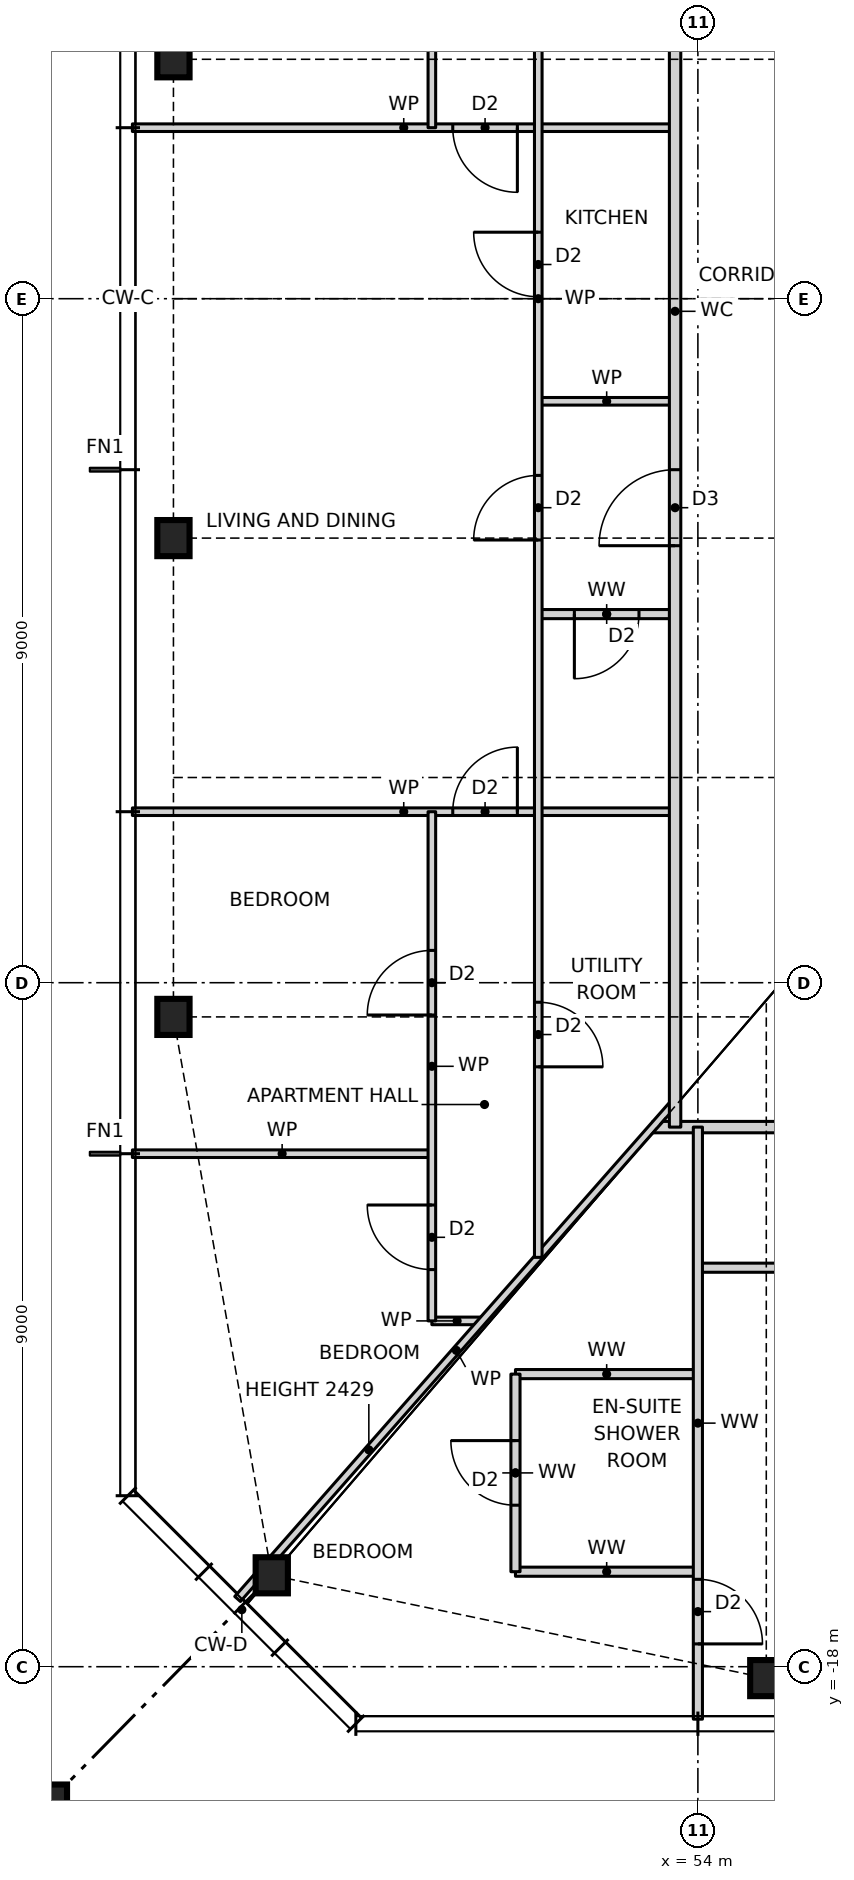
"""IFC4 building model, lengths in metres.
Left out: names, types, materials, properties, quantities, classifications, styles, units other than length and angle.
Written with IfcOpenShell. Run it as: python <this file> out.ifc"""

import sys

from ifc_helpers import new_model, si_unit, direction, frame, frame_2d, origin, origin_2d, place, context, subcontext, project, spatial, rectangle, hollow_rectangle, i_section, extrude, element, fill, save


model = new_model("IFC4")
c1 = context("Model", 3, precision=1e-05, world=origin(), true_north=direction((0.0, 1.0)))
c2 = subcontext(c1, "Body", "Model", "MODEL_VIEW")
j1 = project(units=[si_unit("LENGTHUNIT", "METRE"), si_unit("PLANEANGLEUNIT", "RADIAN")], contexts=[c1])
p1 = place(None, origin())
s1 = spatial("IfcSite", under=j1, at=p1, CompositionType="ELEMENT")
p2 = place(p1, origin())
s2 = spatial("IfcBuilding", under=s1, at=p2, CompositionType="ELEMENT")
p3 = place(p2, frame((0.0, 0.0, 15.0)))
s3 = spatial("IfcBuildingStorey", under=s2, at=p3, CompositionType="ELEMENT", Elevation=15.0)
for number, where, z_axis, x_axis in (
    (1, (48.394, -16.797, 0.0), (0.0, 0.0, 1.0), (1.0, 0.0, 0.0)),
    (2, (54.9, -18.15, 0.0), (0.0, 0.0, 1.0), (1.0, 0.0, 0.0)),
    (3, (47.1, 3.15, 0.0), (0.0, 0.0, 1.0), (1.0, 0.0, 0.0)),
    (4, (47.1, -3.15, 0.0), (0.0, 0.0, 1.0), (1.0, 0.0, 0.0)),
    (5, (47.1, -9.45, 0.0), (0.0, 0.0, 1.0), (1.0, 0.0, 0.0)),
):
    element("IfcColumn", number, at=place(p3, frame(where, z_axis=z_axis, x_axis=x_axis)), inside=s3, PredefinedType="COLUMN", context=c2, shape_type="SweptSolid", body=[
        extrude(i_section(OverallWidth=0.424, OverallDepth=0.475, WebThickness=0.048, FlangeThickness=0.077, at=origin_2d()), origin(), (0.0, 0.0, 1.0), 3.5),
    ])
p4 = place(p3, frame((45.1, -20.15, 0.0), z_axis=(0.0, 0.0, 1.0), x_axis=(1.0, 0.0, 0.0)))
e6 = element("IfcColumn", 6, at=p4, inside=s3, PredefinedType="COLUMN", context=c2, shape_type="SweptSolid", body=[
    extrude(hollow_rectangle(XDim=1.2, YDim=1.2, WallThickness=0.07, at=origin_2d()), origin(), (0.0, 0.0, 1.0), 3.5),
])
for number, where, z_axis, x_axis in (
    (7, (51.6, -16.75, 0.0), (0.0, 0.0, 1.0), (1.0, 0.0, 0.0)),
    (8, (51.6, -14.15, 0.0), (0.0, 0.0, 1.0), (1.0, 0.0, 0.0)),
):
    element("IfcWall", number, at=place(p3, frame(where, z_axis=z_axis, x_axis=x_axis)), inside=s3, PredefinedType="PARTITIONING", context=c2, shape_type="SweptSolid", body=[
        extrude(rectangle(XDim=2.4, YDim=0.12, at=frame_2d((1.2, 0.0))), origin(), (0.0, 0.0, 1.0), 3.27),
    ])
p5 = place(p3, frame((50.5, -13.45, 0.0), z_axis=(0.0, 0.0, 1.0), x_axis=(1.0, 0.0, 0.0)))
e9 = element("IfcWall", 9, at=p5, inside=s3, PredefinedType="PARTITIONING", context=c2, shape_type="SweptSolid", body=[
    extrude(rectangle(XDim=0.664, YDim=0.1, at=frame_2d((0.332, 0.0))), origin(), (0.0, 0.0, 1.0), 3.27),
])
p6 = place(p3, frame((54.0, -12.75, 0.0), z_axis=(0.0, 0.0, 1.0), x_axis=(1.0, 0.0, 0.0)))
e10 = element("IfcWall", 10, at=p6, inside=s3, PredefinedType="PARTITIONING", context=c2, shape_type="SweptSolid", body=[
    extrude(rectangle(XDim=20.2, YDim=0.12, at=frame_2d((10.1, 0.0))), origin(), (0.0, 0.0, 1.0), 3.27),
])
p7 = place(p6, frame((1.375, 0.0, 0.0)))
e11 = element("IfcOpeningElement", 11, at=p7, cuts=e10, PredefinedType="OPENING", context=c2, shape_type="SweptSolid", body=[
    extrude(rectangle(XDim=0.85, YDim=2.1, at=frame_2d((0.425, 1.05))), frame((0.0, 0.07, 0.0), z_axis=(0.0, -1.0, 0.0), x_axis=(1.0, 0.0, 0.0)), (0.0, 0.0, 1.0), 0.14),
])
p8 = place(p6, frame((4.575, 0.0, 0.0)))
e12 = element("IfcOpeningElement", 12, at=p8, cuts=e10, PredefinedType="OPENING", context=c2, shape_type="SweptSolid", body=[
    extrude(rectangle(XDim=0.85, YDim=2.1, at=frame_2d((0.425, 1.05))), frame((0.0, 0.07, 0.0), z_axis=(0.0, -1.0, 0.0), x_axis=(1.0, 0.0, 0.0)), (0.0, 0.0, 1.0), 0.14),
])
p9 = place(p6, frame((10.725, 0.0, 0.0)))
e13 = element("IfcOpeningElement", 13, at=p9, cuts=e10, PredefinedType="OPENING", context=c2, shape_type="SweptSolid", body=[
    extrude(rectangle(XDim=0.85, YDim=2.1, at=frame_2d((0.425, 1.05))), frame((0.0, 0.07, 0.0), z_axis=(0.0, -1.0, 0.0), x_axis=(1.0, 0.0, 0.0)), (0.0, 0.0, 1.0), 0.14),
])
p10 = place(p6, frame((16.325, 0.0, 0.0)))
e14 = element("IfcOpeningElement", 14, at=p10, cuts=e10, PredefinedType="OPENING", context=c2, shape_type="SweptSolid", body=[
    extrude(rectangle(XDim=0.85, YDim=2.1, at=frame_2d((0.425, 1.05))), frame((0.0, 0.07, 0.0), z_axis=(0.0, -1.0, 0.0), x_axis=(1.0, 0.0, 0.0)), (0.0, 0.0, 1.0), 0.14),
])
p11 = place(p3, frame((46.56, -11.25, 0.0), z_axis=(0.0, 0.0, 1.0), x_axis=(1.0, 0.0, 0.0)))
e15 = element("IfcWall", 15, at=p11, inside=s3, PredefinedType="PARTITIONING", context=c2, shape_type="SweptSolid", body=[
    extrude(rectangle(XDim=3.94, YDim=0.1, at=frame_2d((1.97, 0.0))), origin(), (0.0, 0.0, 1.0), 3.27),
])
p12 = place(p3, frame((53.408, -10.9, 0.0), z_axis=(0.0, 0.0, 1.0), x_axis=(1.0, 0.0, 0.0)))
e16 = element("IfcWall", 16, at=p12, inside=s3, PredefinedType="PARTITIONING", context=c2, shape_type="SweptSolid", body=[
    extrude(rectangle(XDim=19.184, YDim=0.15, at=frame_2d((9.592, 0.0))), origin(), (0.0, 0.0, 1.0), 3.27),
])
p13 = place(p12, frame((5.092, 0.0, 0.0)))
e17 = element("IfcOpeningElement", 17, at=p13, cuts=e16, PredefinedType="OPENING", context=c2, shape_type="SweptSolid", body=[
    extrude(rectangle(XDim=1.0, YDim=2.1, at=frame_2d((0.5, 1.05))), frame((0.0, 0.085, 0.0), z_axis=(0.0, -1.0, 0.0), x_axis=(1.0, 0.0, 0.0)), (0.0, 0.0, 1.0), 0.17),
])
p14 = place(p3, frame((46.56, -6.75, 0.0), z_axis=(0.0, 0.0, 1.0), x_axis=(1.0, 0.0, 0.0)))
e18 = element("IfcWall", 18, at=p14, inside=s3, PredefinedType="PARTITIONING", context=c2, shape_type="SweptSolid", body=[
    extrude(rectangle(XDim=7.14, YDim=0.1, at=frame_2d((3.57, 0.0))), origin(), (0.0, 0.0, 1.0), 3.27),
])
p15 = place(p14, frame((4.215, 0.0, 0.0)))
e19 = element("IfcOpeningElement", 19, at=p15, cuts=e18, PredefinedType="OPENING", context=c2, shape_type="SweptSolid", body=[
    extrude(rectangle(XDim=0.85, YDim=2.1, at=frame_2d((0.425, 1.05))), frame((0.0, 0.06, 0.0), z_axis=(0.0, -1.0, 0.0), x_axis=(1.0, 0.0, 0.0)), (0.0, 0.0, 1.0), 0.12),
])
p16 = place(p3, frame((51.9, -4.15, 0.0), z_axis=(0.0, 0.0, 1.0), x_axis=(1.0, 0.0, 0.0)))
e20 = element("IfcWall", 20, at=p16, inside=s3, PredefinedType="PARTITIONING", context=c2, shape_type="SweptSolid", body=[
    extrude(rectangle(XDim=1.8, YDim=0.12, at=frame_2d((0.9, 0.0))), origin(), (0.0, 0.0, 1.0), 3.27),
])
p17 = place(p16, frame((0.475, 0.0, 0.0)))
e21 = element("IfcOpeningElement", 21, at=p17, cuts=e20, PredefinedType="OPENING", context=c2, shape_type="SweptSolid", body=[
    extrude(rectangle(XDim=0.85, YDim=2.1, at=frame_2d((0.425, 1.05))), frame((0.0, 0.07, 0.0), z_axis=(0.0, -1.0, 0.0), x_axis=(1.0, 0.0, 0.0)), (0.0, 0.0, 1.0), 0.14),
])
p18 = place(p3, frame((51.9, -1.35, 0.0), z_axis=(0.0, 0.0, 1.0), x_axis=(1.0, 0.0, 0.0)))
e22 = element("IfcWall", 22, at=p18, inside=s3, PredefinedType="PARTITIONING", context=c2, shape_type="SweptSolid", body=[
    extrude(rectangle(XDim=1.8, YDim=0.1, at=frame_2d((0.9, 0.0))), origin(), (0.0, 0.0, 1.0), 3.27),
])
p19 = place(p3, frame((46.56, 2.25, 0.0), z_axis=(0.0, 0.0, 1.0), x_axis=(1.0, 0.0, 0.0)))
e23 = element("IfcWall", 23, at=p19, inside=s3, PredefinedType="PARTITIONING", context=c2, shape_type="SweptSolid", body=[
    extrude(rectangle(XDim=7.14, YDim=0.1, at=frame_2d((3.57, 0.0))), origin(), (0.0, 0.0, 1.0), 3.27),
])
p20 = place(p19, frame((4.215, 0.0, 0.0)))
e24 = element("IfcOpeningElement", 24, at=p20, cuts=e23, PredefinedType="OPENING", context=c2, shape_type="SweptSolid", body=[
    extrude(rectangle(XDim=0.85, YDim=2.1, at=frame_2d((0.425, 1.05))), frame((0.0, 0.06, 0.0), z_axis=(0.0, -1.0, 0.0), x_axis=(1.0, 0.0, 0.0)), (0.0, 0.0, 1.0), 0.12),
])
p21 = place(p3, frame((47.944, -17.109, 0.0), z_axis=(0.0, 0.0, 1.0), x_axis=(0.660612734851, 0.750726857487, 0.0)))
e25 = element("IfcWall", 25, at=p21, inside=s3, PredefinedType="PARTITIONING", context=c2, shape_type="SweptSolid", body=[
    extrude(rectangle(XDim=8.713, YDim=0.1, at=frame_2d((4.356, 0.0))), origin(), (0.0, 0.0, 1.0), 2.429),
])
p22 = place(p3, frame((54.0, -18.69, 0.0), z_axis=(0.0, 0.0, 1.0), x_axis=(0.0, 1.0, 0.0)))
e26 = element("IfcWall", 26, at=p22, inside=s3, PredefinedType="PARTITIONING", context=c2, shape_type="SweptSolid", body=[
    extrude(rectangle(XDim=7.79, YDim=0.12, at=frame_2d((3.895, 0.0))), origin(), (0.0, 0.0, 1.0), 3.27),
])
p23 = place(p22, frame((0.99, 0.0, 0.0)))
e27 = element("IfcOpeningElement", 27, at=p23, cuts=e26, PredefinedType="OPENING", context=c2, shape_type="SweptSolid", body=[
    extrude(rectangle(XDim=0.85, YDim=2.1, at=frame_2d((0.425, 1.05))), frame((0.0, 0.07, 0.0), z_axis=(0.0, -1.0, 0.0), x_axis=(1.0, 0.0, 0.0)), (0.0, 0.0, 1.0), 0.14),
])
p24 = place(p3, frame((53.7, -10.9, 0.0), z_axis=(0.0, 0.0, 1.0), x_axis=(0.0, 1.0, 0.0)))
e28 = element("IfcWall", 28, at=p24, inside=s3, PredefinedType="PARTITIONING", context=c2, shape_type="SweptSolid", body=[
    extrude(rectangle(XDim=21.468, YDim=0.15, at=frame_2d((10.734, 0.0))), origin(), (0.0, 0.0, 1.0), 3.27),
])
p25 = place(p24, frame((7.65, 0.0, 0.0)))
e29 = element("IfcOpeningElement", 29, at=p25, cuts=e28, PredefinedType="OPENING", context=c2, shape_type="SweptSolid", body=[
    extrude(rectangle(XDim=1.0, YDim=2.1, at=frame_2d((0.5, 1.05))), frame((0.0, 0.085, 0.0), z_axis=(0.0, -1.0, 0.0), x_axis=(1.0, 0.0, 0.0)), (0.0, 0.0, 1.0), 0.17),
])
p26 = place(p3, frame((51.9, -12.614, 0.0), z_axis=(0.0, 0.0, 1.0), x_axis=(0.0, 1.0, 0.0)))
e30 = element("IfcWall", 30, at=p26, inside=s3, PredefinedType="PARTITIONING", context=c2, shape_type="SweptSolid", body=[
    extrude(rectangle(XDim=25.228, YDim=0.1, at=frame_2d((12.614, 0.0))), origin(), (0.0, 0.0, 1.0), 3.27),
])
p27 = place(p26, frame((12.639, 0.0, 0.0)))
e31 = element("IfcOpeningElement", 31, at=p27, cuts=e30, PredefinedType="OPENING", context=c2, shape_type="SweptSolid", body=[
    extrude(rectangle(XDim=0.85, YDim=2.1, at=frame_2d((0.425, 1.05))), frame((0.0, 0.06, 0.0), z_axis=(0.0, -1.0, 0.0), x_axis=(1.0, 0.0, 0.0)), (0.0, 0.0, 1.0), 0.12),
])
p28 = place(p26, frame((9.439, 0.0, 0.0)))
e32 = element("IfcOpeningElement", 32, at=p28, cuts=e30, PredefinedType="OPENING", context=c2, shape_type="SweptSolid", body=[
    extrude(rectangle(XDim=0.85, YDim=2.1, at=frame_2d((0.425, 1.05))), frame((0.0, 0.06, 0.0), z_axis=(0.0, -1.0, 0.0), x_axis=(1.0, 0.0, 0.0)), (0.0, 0.0, 1.0), 0.12),
])
p29 = place(p26, frame((16.639, 0.0, 0.0)))
e33 = element("IfcOpeningElement", 33, at=p29, cuts=e30, PredefinedType="OPENING", context=c2, shape_type="SweptSolid", body=[
    extrude(rectangle(XDim=0.85, YDim=2.1, at=frame_2d((0.425, 1.05))), frame((0.0, 0.06, 0.0), z_axis=(0.0, -1.0, 0.0), x_axis=(1.0, 0.0, 0.0)), (0.0, 0.0, 1.0), 0.12),
])
p30 = place(p26, frame((21.821, 0.0, 0.0)))
e34 = element("IfcOpeningElement", 34, at=p30, cuts=e30, PredefinedType="OPENING", context=c2, shape_type="SweptSolid", body=[
    extrude(rectangle(XDim=0.85, YDim=2.1, at=frame_2d((0.425, 1.05))), frame((0.0, 0.06, 0.0), z_axis=(0.0, -1.0, 0.0), x_axis=(1.0, 0.0, 0.0)), (0.0, 0.0, 1.0), 0.12),
])
p31 = place(p26, frame((2.507, 0.0, 0.0)))
e35 = element("IfcOpeningElement", 35, at=p31, cuts=e30, PredefinedType="OPENING", context=c2, shape_type="SweptSolid", body=[
    extrude(rectangle(XDim=0.85, YDim=2.1, at=frame_2d((0.425, 1.05))), frame((0.0, 0.06, 0.0), z_axis=(0.0, -1.0, 0.0), x_axis=(1.0, 0.0, 0.0)), (0.0, 0.0, 1.0), 0.12),
])
p32 = place(p3, frame((51.6, -16.75, 0.0), z_axis=(0.0, 0.0, 1.0), x_axis=(0.0, 1.0, 0.0)))
e36 = element("IfcWall", 36, at=p32, inside=s3, PredefinedType="PARTITIONING", context=c2, shape_type="SweptSolid", body=[
    extrude(rectangle(XDim=2.6, YDim=0.12, at=frame_2d((1.3, 0.0))), origin(), (0.0, 0.0, 1.0), 3.27),
])
p33 = place(p32, frame((0.875, 0.0, 0.0)))
e37 = element("IfcOpeningElement", 37, at=p33, cuts=e36, PredefinedType="OPENING", context=c2, shape_type="SweptSolid", body=[
    extrude(rectangle(XDim=0.85, YDim=2.1, at=frame_2d((0.425, 1.05))), frame((0.0, 0.07, 0.0), z_axis=(0.0, -1.0, 0.0), x_axis=(1.0, 0.0, 0.0)), (0.0, 0.0, 1.0), 0.14),
])
p34 = place(p3, frame((50.5, -13.45, 0.0), z_axis=(0.0, 0.0, 1.0), x_axis=(0.0, 1.0, 0.0)))
e38 = element("IfcWall", 38, at=p34, inside=s3, PredefinedType="PARTITIONING", context=c2, shape_type="SweptSolid", body=[
    extrude(rectangle(XDim=6.7, YDim=0.1, at=frame_2d((3.35, 0.0))), origin(), (0.0, 0.0, 1.0), 3.27),
])
p35 = place(p34, frame((4.025, 0.0, 0.0)))
e39 = element("IfcOpeningElement", 39, at=p35, cuts=e38, PredefinedType="OPENING", context=c2, shape_type="SweptSolid", body=[
    extrude(rectangle(XDim=0.85, YDim=2.1, at=frame_2d((0.425, 1.05))), frame((0.0, 0.06, 0.0), z_axis=(0.0, -1.0, 0.0), x_axis=(1.0, 0.0, 0.0)), (0.0, 0.0, 1.0), 0.12),
])
p36 = place(p34, frame((0.675, 0.0, 0.0)))
e40 = element("IfcOpeningElement", 40, at=p36, cuts=e38, PredefinedType="OPENING", context=c2, shape_type="SweptSolid", body=[
    extrude(rectangle(XDim=0.85, YDim=2.1, at=frame_2d((0.425, 1.05))), frame((0.0, 0.06, 0.0), z_axis=(0.0, -1.0, 0.0), x_axis=(1.0, 0.0, 0.0)), (0.0, 0.0, 1.0), 0.12),
])
p37 = place(p3, frame((50.5, 2.25, 0.0), z_axis=(0.0, 0.0, 1.0), x_axis=(0.0, 1.0, 0.0)))
e41 = element("IfcWall", 41, at=p37, inside=s3, PredefinedType="PARTITIONING", context=c2, shape_type="SweptSolid", body=[
    extrude(rectangle(XDim=11.2, YDim=0.1, at=frame_2d((5.6, 0.0))), origin(), (0.0, 0.0, 1.0), 3.27),
])
p38 = place(p37, frame((1.825, 0.0, 0.0)))
e42 = element("IfcOpeningElement", 42, at=p38, cuts=e41, PredefinedType="OPENING", context=c2, shape_type="SweptSolid", body=[
    extrude(rectangle(XDim=0.85, YDim=2.1, at=frame_2d((0.425, 1.05))), frame((0.0, 0.06, 0.0), z_axis=(0.0, -1.0, 0.0), x_axis=(1.0, 0.0, 0.0)), (0.0, 0.0, 1.0), 0.12),
])
p39 = place(p37, frame((5.125, 0.0, 0.0)))
e43 = element("IfcOpeningElement", 43, at=p39, cuts=e41, PredefinedType="OPENING", context=c2, shape_type="SweptSolid", body=[
    extrude(rectangle(XDim=0.85, YDim=2.1, at=frame_2d((0.425, 1.05))), frame((0.0, 0.06, 0.0), z_axis=(0.0, -1.0, 0.0), x_axis=(1.0, 0.0, 0.0)), (0.0, 0.0, 1.0), 0.12),
])
p40 = place(p37, frame((9.675, 0.0, 0.0)))
e44 = element("IfcOpeningElement", 44, at=p40, cuts=e41, PredefinedType="OPENING", context=c2, shape_type="SweptSolid", body=[
    extrude(rectangle(XDim=0.85, YDim=2.1, at=frame_2d((0.425, 1.05))), frame((0.0, 0.06, 0.0), z_axis=(0.0, -1.0, 0.0), x_axis=(1.0, 0.0, 0.0)), (0.0, 0.0, 1.0), 0.12),
])
p41 = place(p33, origin())
e45 = element("IfcDoor", 45, at=p41, inside=s3, OperationType="SINGLE_SWING_RIGHT", PredefinedType="DOOR", context=c2, shape_type="SweptSolid", body=[
    extrude(rectangle(XDim=0.85, YDim=2.1, at=frame_2d((0.425, 1.05))), frame((0.0, 0.025, 0.0), z_axis=(0.0, -1.0, 0.0), x_axis=(1.0, 0.0, 0.0)), (0.0, 0.0, 1.0), 0.05),
])
fill(e37, e45)
p42 = place(p23, frame((0.85, 0.0, 0.0), z_axis=(0.0, 0.0, 1.0), x_axis=(-1.0, 0.0, 0.0)))
e46 = element("IfcDoor", 46, at=p42, inside=s3, OperationType="SINGLE_SWING_RIGHT", PredefinedType="DOOR", context=c2, shape_type="SweptSolid", body=[
    extrude(rectangle(XDim=0.85, YDim=2.1, at=frame_2d((0.425, 1.05))), frame((0.0, 0.025, 0.0), z_axis=(0.0, -1.0, 0.0), x_axis=(1.0, 0.0, 0.0)), (0.0, 0.0, 1.0), 0.05),
])
fill(e27, e46)
p43 = place(p27, origin())
e47 = element("IfcDoor", 47, at=p43, inside=s3, OperationType="SINGLE_SWING_RIGHT", PredefinedType="DOOR", context=c2, shape_type="SweptSolid", body=[
    extrude(rectangle(XDim=0.85, YDim=2.1, at=frame_2d((0.425, 1.05))), frame((0.0, 0.025, 0.0), z_axis=(0.0, -1.0, 0.0), x_axis=(1.0, 0.0, 0.0)), (0.0, 0.0, 1.0), 0.05),
])
fill(e31, e47)
p44 = place(p25, origin())
e48 = element("IfcDoor", 48, at=p44, inside=s3, OperationType="SINGLE_SWING_LEFT", PredefinedType="DOOR", context=c2, shape_type="SweptSolid", body=[
    extrude(rectangle(XDim=1.0, YDim=2.1, at=frame_2d((0.5, 1.05))), frame((0.0, 0.025, 0.0), z_axis=(0.0, -1.0, 0.0), x_axis=(1.0, 0.0, 0.0)), (0.0, 0.0, 1.0), 0.05),
])
fill(e29, e48)
p45 = place(p28, origin())
e49 = element("IfcDoor", 49, at=p45, inside=s3, OperationType="SINGLE_SWING_LEFT", PredefinedType="DOOR", context=c2, shape_type="SweptSolid", body=[
    extrude(rectangle(XDim=0.85, YDim=2.1, at=frame_2d((0.425, 1.05))), frame((0.0, 0.025, 0.0), z_axis=(0.0, -1.0, 0.0), x_axis=(1.0, 0.0, 0.0)), (0.0, 0.0, 1.0), 0.05),
])
fill(e32, e49)
p46 = place(p17, frame((0.85, 0.0, 0.0), z_axis=(0.0, 0.0, 1.0), x_axis=(-1.0, 0.0, 0.0)))
e50 = element("IfcDoor", 50, at=p46, inside=s3, OperationType="SINGLE_SWING_RIGHT", PredefinedType="DOOR", context=c2, shape_type="SweptSolid", body=[
    extrude(rectangle(XDim=0.85, YDim=2.1, at=frame_2d((0.425, 1.05))), frame((0.0, 0.025, 0.0), z_axis=(0.0, -1.0, 0.0), x_axis=(1.0, 0.0, 0.0)), (0.0, 0.0, 1.0), 0.05),
])
fill(e21, e50)
p47 = place(p20, frame((0.85, 0.0, 0.0), z_axis=(0.0, 0.0, 1.0), x_axis=(-1.0, 0.0, 0.0)))
e51 = element("IfcDoor", 51, at=p47, inside=s3, OperationType="SINGLE_SWING_LEFT", PredefinedType="DOOR", context=c2, shape_type="SweptSolid", body=[
    extrude(rectangle(XDim=0.85, YDim=2.1, at=frame_2d((0.425, 1.05))), frame((0.0, 0.025, 0.0), z_axis=(0.0, -1.0, 0.0), x_axis=(1.0, 0.0, 0.0)), (0.0, 0.0, 1.0), 0.05),
])
fill(e24, e51)
p48 = place(p15, origin())
e52 = element("IfcDoor", 52, at=p48, inside=s3, OperationType="SINGLE_SWING_RIGHT", PredefinedType="DOOR", context=c2, shape_type="SweptSolid", body=[
    extrude(rectangle(XDim=0.85, YDim=2.1, at=frame_2d((0.425, 1.05))), frame((0.0, 0.025, 0.0), z_axis=(0.0, -1.0, 0.0), x_axis=(1.0, 0.0, 0.0)), (0.0, 0.0, 1.0), 0.05),
])
fill(e19, e52)
p49 = place(p35, origin())
e53 = element("IfcDoor", 53, at=p49, inside=s3, OperationType="SINGLE_SWING_LEFT", PredefinedType="DOOR", context=c2, shape_type="SweptSolid", body=[
    extrude(rectangle(XDim=0.85, YDim=2.1, at=frame_2d((0.425, 1.05))), frame((0.0, 0.025, 0.0), z_axis=(0.0, -1.0, 0.0), x_axis=(1.0, 0.0, 0.0)), (0.0, 0.0, 1.0), 0.05),
])
fill(e39, e53)
p50 = place(p36, origin())
e54 = element("IfcDoor", 54, at=p50, inside=s3, OperationType="SINGLE_SWING_RIGHT", PredefinedType="DOOR", context=c2, shape_type="SweptSolid", body=[
    extrude(rectangle(XDim=0.85, YDim=2.1, at=frame_2d((0.425, 1.05))), frame((0.0, 0.025, 0.0), z_axis=(0.0, -1.0, 0.0), x_axis=(1.0, 0.0, 0.0)), (0.0, 0.0, 1.0), 0.05),
])
fill(e40, e54)
p51 = place(p31, frame((0.85, 0.0, 0.0), z_axis=(0.0, 0.0, 1.0), x_axis=(-1.0, 0.0, 0.0)))
e55 = element("IfcDoor", 55, at=p51, inside=s3, OperationType="SINGLE_SWING_RIGHT", PredefinedType="DOOR", context=c2, shape_type="SweptSolid", body=[
    extrude(rectangle(XDim=0.85, YDim=2.1, at=frame_2d((0.425, 1.05))), frame((0.0, 0.025, 0.0), z_axis=(0.0, -1.0, 0.0), x_axis=(1.0, 0.0, 0.0)), (0.0, 0.0, 1.0), 0.05),
])
fill(e35, e55)
save(model, sys.argv[1])
